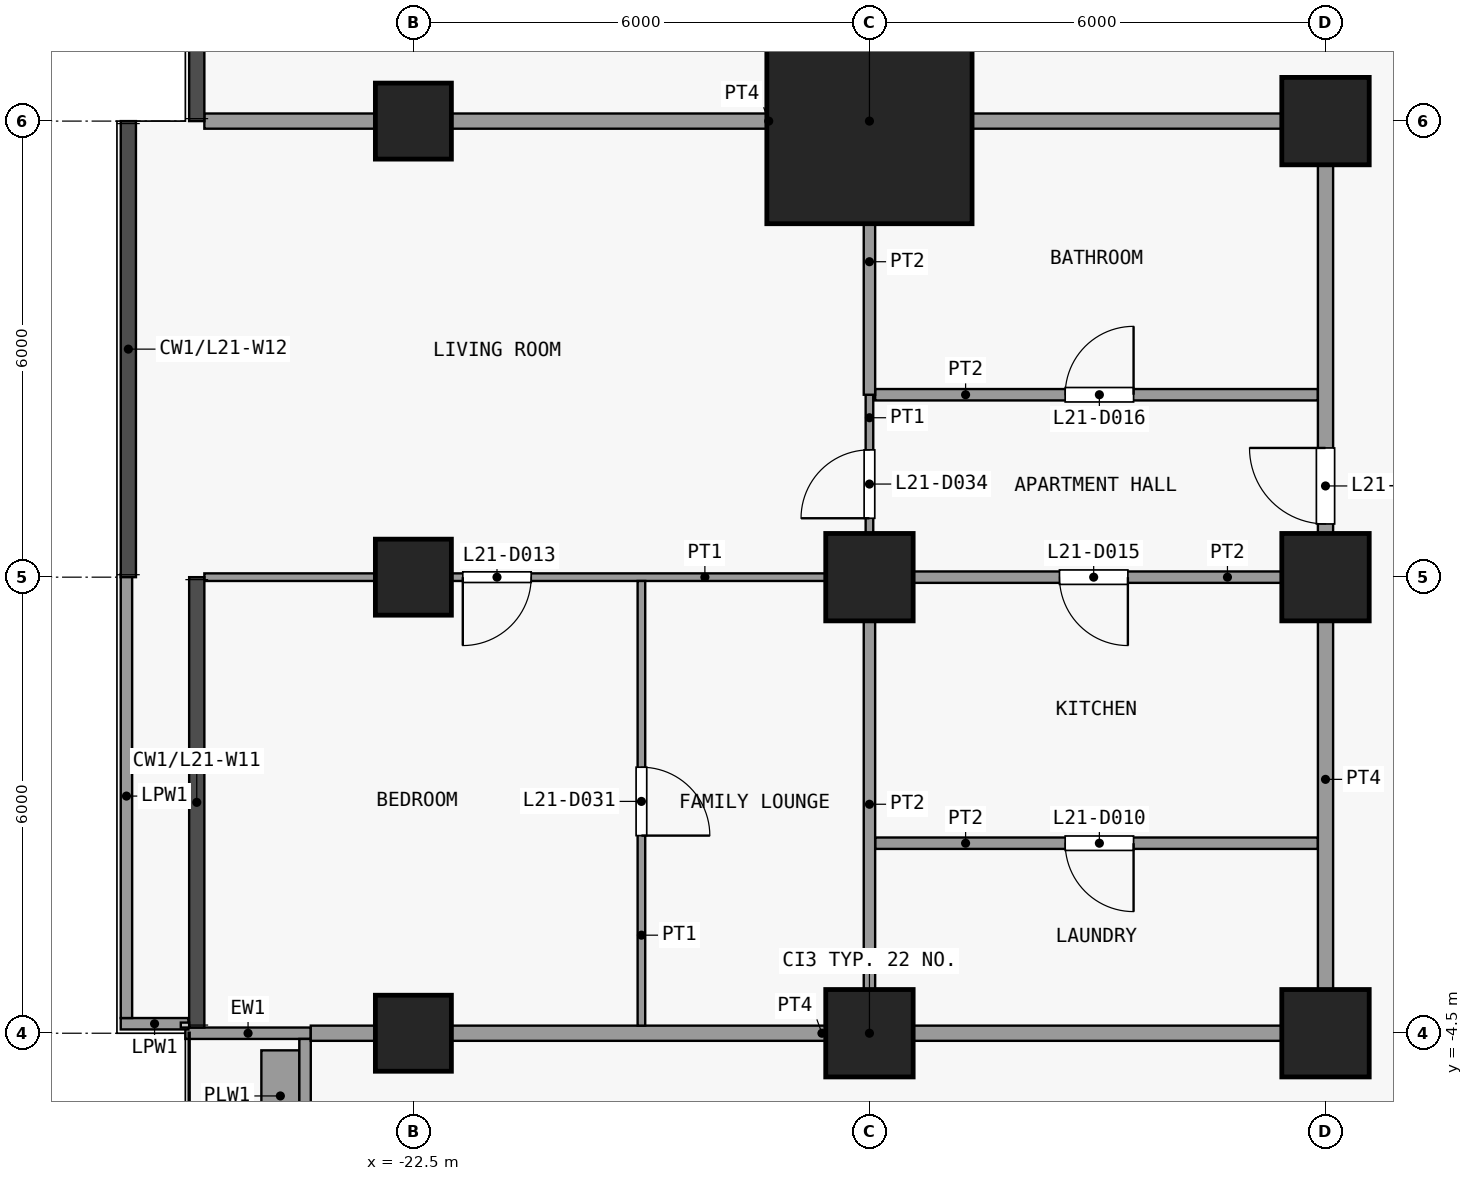
"""IFC4 building model, lengths in metres.
Left out: names, types, materials, properties, quantities, classifications, styles, units other than length and angle.
Written with IfcOpenShell. Run it as: python <this file> out.ifc"""

import sys

from ifc_helpers import new_model, si_unit, direction, frame, frame_2d, origin, origin_2d, place, context, subcontext, project, spatial, rectangle, extrude, element, fill, save


model = new_model("IFC4")
c1 = context("Model", 3, precision=1e-05, world=origin(), true_north=direction((0.0, 1.0)))
c2 = subcontext(c1, "Body", "Model", "MODEL_VIEW")
j1 = project(units=[si_unit("LENGTHUNIT", "METRE"), si_unit("PLANEANGLEUNIT", "RADIAN")], contexts=[c1])
p1 = place(None, origin())
s1 = spatial("IfcSite", under=j1, at=p1, CompositionType="ELEMENT")
p2 = place(p1, origin())
s2 = spatial("IfcBuilding", under=s1, at=p2, CompositionType="ELEMENT")
p3 = place(p2, frame((0.0, 0.0, 88.3)))
s3 = spatial("IfcBuildingStorey", under=s2, at=p3, CompositionType="ELEMENT", Elevation=88.3)
for number, where, z_axis, x_axis in (
    (1, (-22.5, -4.5, 0.0), (0.0, 0.0, 1.0), (1.0, 0.0, 0.0)),
    (2, (-22.5, 1.5, 0.0), (0.0, 0.0, 1.0), (1.0, 0.0, 0.0)),
    (3, (-22.5, 7.5, 0.0), (0.0, 0.0, 1.0), (1.0, 0.0, 0.0)),
):
    element("IfcColumn", number, at=place(p3, frame(where, z_axis=z_axis, x_axis=x_axis)), inside=s3, PredefinedType="COLUMN", context=c2, shape_type="SweptSolid", body=[
        extrude(rectangle(XDim=1.0, YDim=1.0, at=origin_2d()), origin(), (0.0, 0.0, 1.0), 3.6),
    ])
for number, where, z_axis, x_axis in (
    (4, (-16.5, -4.5, 0.0), (0.0, 0.0, 1.0), (1.0, 0.0, 0.0)),
    (5, (-16.5, 1.5, 0.0), (0.0, 0.0, 1.0), (1.0, 0.0, 0.0)),
):
    element("IfcColumn", number, at=place(p3, frame(where, z_axis=z_axis, x_axis=x_axis)), inside=s3, PredefinedType="COLUMN", context=c2, shape_type="SweptSolid", body=[
        extrude(rectangle(XDim=1.15, YDim=1.15, at=origin_2d()), origin(), (0.0, 0.0, 1.0), 3.6),
    ])
p4 = place(p3, frame((-16.5, 7.5, 0.0), z_axis=(0.0, 0.0, 1.0), x_axis=(1.0, 0.0, 0.0)))
e6 = element("IfcColumn", 6, at=p4, inside=s3, PredefinedType="COLUMN", context=c2, shape_type="SweptSolid", body=[
    extrude(rectangle(XDim=2.7, YDim=2.7, at=origin_2d()), origin(), (0.0, 0.0, 1.0), 3.6),
])
for number, where, z_axis, x_axis in (
    (7, (-10.5, -4.5, 0.0), (0.0, 0.0, 1.0), (1.0, 0.0, 0.0)),
    (8, (-10.5, 1.5, 0.0), (0.0, 0.0, 1.0), (1.0, 0.0, 0.0)),
    (9, (-10.5, 7.5, 0.0), (0.0, 0.0, 1.0), (1.0, 0.0, 0.0)),
):
    element("IfcColumn", number, at=place(p3, frame(where, z_axis=z_axis, x_axis=x_axis)), inside=s3, PredefinedType="COLUMN", context=c2, shape_type="SweptSolid", body=[
        extrude(rectangle(XDim=1.15, YDim=1.15, at=origin_2d()), origin(), (0.0, 0.0, 1.0), 3.6),
    ])
p5 = place(p3, frame((-23.85, -4.5, 0.0), z_axis=(0.0, 0.0, 1.0), x_axis=(-1.0, 0.0, 0.0)))
e10 = element("IfcWall", 10, at=p5, inside=s3, PredefinedType="SOLIDWALL", context=c2, shape_type="SweptSolid", body=[
    extrude(rectangle(XDim=1.65, YDim=0.15, at=frame_2d((0.825, 0.0))), origin(), (0.0, 0.0, 1.0), 3.3),
])
p6 = place(p3, frame((-23.925, -13.425, 0.0), z_axis=(0.0, 0.0, 1.0), x_axis=(0.0, 1.0, 0.0)))
e11 = element("IfcWall", 11, at=p6, inside=s3, PredefinedType="SOLIDWALL", context=c2, shape_type="SweptSolid", body=[
    extrude(rectangle(XDim=8.85, YDim=0.15, at=frame_2d((4.425, 0.0))), origin(), (0.0, 0.0, 1.0), 3.3),
])
p7 = place(p6, frame((2.125, 0.0, 0.0)))
e12 = element("IfcOpeningElement", 12, at=p7, cuts=e11, PredefinedType="OPENING", context=c2, shape_type="SweptSolid", body=[
    extrude(rectangle(XDim=1.2, YDim=2.4, at=frame_2d((0.6, 1.2))), frame((0.0, 0.085, 0.0), z_axis=(0.0, -1.0, 0.0), x_axis=(1.0, 0.0, 0.0)), (0.0, 0.0, 1.0), 0.17),
])
p8 = place(p6, frame((0.25, 0.0, 0.9)))
e13 = element("IfcOpeningElement", 13, at=p8, cuts=e11, PredefinedType="OPENING", context=c2, shape_type="SweptSolid", body=[
    extrude(rectangle(XDim=1.625, YDim=2.1, at=frame_2d((0.812, 1.05))), frame((0.0, 0.085, 0.0), z_axis=(0.0, -1.0, 0.0), x_axis=(1.0, 0.0, 0.0)), (0.0, 0.0, 1.0), 0.17),
])
p9 = place(p6, frame((5.775, 0.0, 0.9)))
e14 = element("IfcOpeningElement", 14, at=p9, cuts=e11, PredefinedType="OPENING", context=c2, shape_type="SweptSolid", body=[
    extrude(rectangle(XDim=1.812, YDim=2.1, at=frame_2d((0.906, 1.05))), frame((0.0, 0.085, 0.0), z_axis=(0.0, -1.0, 0.0), x_axis=(1.0, 0.0, 0.0)), (0.0, 0.0, 1.0), 0.17),
])
p10 = place(p3, frame((-24.25, -5.925, 0.0), z_axis=(0.0, 0.0, 1.0), x_axis=(0.0, 1.0, 0.0)))
e15 = element("IfcWall", 15, at=p10, inside=s3, PredefinedType="USERDEFINED", context=c2, shape_type="SweptSolid", body=[
    extrude(rectangle(XDim=1.2, YDim=0.5, at=frame_2d((0.6, 0.0))), origin(), (0.0, 0.0, 1.0), 0.9),
])
p11 = place(p3, frame((-25.46, -4.375, 0.0), z_axis=(0.0, 0.0, 1.0), x_axis=(-1.0, 0.0, 0.0)))
e16 = element("IfcWall", 16, at=p11, inside=s3, PredefinedType="PARAPET", context=c2, shape_type="SweptSolid", body=[
    extrude(rectangle(XDim=0.89, YDim=0.15, at=frame_2d((0.445, 0.0))), origin(), (0.0, 0.0, 1.0), 1.15),
])
p12 = place(p3, frame((-26.275, -4.3, 0.0), z_axis=(0.0, 0.0, 1.0), x_axis=(0.0, 1.0, 0.0)))
e17 = element("IfcWall", 17, at=p12, inside=s3, PredefinedType="PARAPET", context=c2, shape_type="SweptSolid", body=[
    extrude(rectangle(XDim=5.84, YDim=0.15, at=frame_2d((2.92, 0.0))), origin(), (0.0, 0.0, 1.0), 1.15),
])
p13 = place(p3, frame((-23.85, -4.5, 0.0), z_axis=(0.0, 0.0, 1.0), x_axis=(1.0, 0.0, 0.0)))
e18 = element("IfcWall", 18, at=p13, inside=s3, PredefinedType="PARTITIONING", context=c2, shape_type="SweptSolid", body=[
    extrude(rectangle(XDim=13.45, YDim=0.2, at=frame_2d((6.725, 0.0))), origin(), (0.0, 0.0, 1.0), 3.3),
])
p14 = place(p3, frame((-16.425, -2.0, 0.0), z_axis=(0.0, 0.0, 1.0), x_axis=(1.0, 0.0, 0.0)))
e19 = element("IfcWall", 19, at=p14, inside=s3, PredefinedType="PARTITIONING", context=c2, shape_type="SweptSolid", body=[
    extrude(rectangle(XDim=5.825, YDim=0.15, at=frame_2d((2.913, 0.0))), origin(), (0.0, 0.0, 1.0), 3.3),
])
p15 = place(p14, frame((2.5, 0.0, 0.0)))
e20 = element("IfcOpeningElement", 20, at=p15, cuts=e19, PredefinedType="OPENING", context=c2, shape_type="SweptSolid", body=[
    extrude(rectangle(XDim=0.9, YDim=2.1, at=frame_2d((0.45, 1.05))), frame((0.0, 0.085, 0.0), z_axis=(0.0, -1.0, 0.0), x_axis=(1.0, 0.0, 0.0)), (0.0, 0.0, 1.0), 0.17),
])
p16 = place(p3, frame((-25.25, 1.5, 0.0), z_axis=(0.0, 0.0, 1.0), x_axis=(1.0, 0.0, 0.0)))
e21 = element("IfcWall", 21, at=p16, inside=s3, PredefinedType="PARTITIONING", context=c2, shape_type="SweptSolid", body=[
    extrude(rectangle(XDim=8.75, YDim=0.1, at=frame_2d((4.375, 0.0))), origin(), (0.0, 0.0, 1.0), 3.3),
])
p17 = place(p16, frame((3.4, 0.0, 0.0)))
e22 = element("IfcOpeningElement", 22, at=p17, cuts=e21, PredefinedType="OPENING", context=c2, shape_type="SweptSolid", body=[
    extrude(rectangle(XDim=0.9, YDim=2.1, at=frame_2d((0.45, 1.05))), frame((0.0, 0.06, 0.0), z_axis=(0.0, -1.0, 0.0), x_axis=(1.0, 0.0, 0.0)), (0.0, 0.0, 1.0), 0.12),
])
p18 = place(p3, frame((-16.5, 1.5, 0.0), z_axis=(0.0, 0.0, 1.0), x_axis=(1.0, 0.0, 0.0)))
e23 = element("IfcWall", 23, at=p18, inside=s3, PredefinedType="PARTITIONING", context=c2, shape_type="SweptSolid", body=[
    extrude(rectangle(XDim=5.9, YDim=0.15, at=frame_2d((2.95, 0.0))), origin(), (0.0, 0.0, 1.0), 3.3),
])
p19 = place(p18, frame((2.5, 0.0, 0.0)))
e24 = element("IfcOpeningElement", 24, at=p19, cuts=e23, PredefinedType="OPENING", context=c2, shape_type="SweptSolid", body=[
    extrude(rectangle(XDim=0.9, YDim=2.1, at=frame_2d((0.45, 1.05))), frame((0.0, 0.085, 0.0), z_axis=(0.0, -1.0, 0.0), x_axis=(1.0, 0.0, 0.0)), (0.0, 0.0, 1.0), 0.17),
])
p20 = place(p3, frame((-16.425, 3.9, 0.0), z_axis=(0.0, 0.0, 1.0), x_axis=(1.0, 0.0, 0.0)))
e25 = element("IfcWall", 25, at=p20, inside=s3, PredefinedType="PARTITIONING", context=c2, shape_type="SweptSolid", body=[
    extrude(rectangle(XDim=5.825, YDim=0.15, at=frame_2d((2.913, 0.0))), origin(), (0.0, 0.0, 1.0), 3.3),
])
p21 = place(p20, frame((2.5, 0.0, 0.0)))
e26 = element("IfcOpeningElement", 26, at=p21, cuts=e25, PredefinedType="OPENING", context=c2, shape_type="SweptSolid", body=[
    extrude(rectangle(XDim=0.9, YDim=2.1, at=frame_2d((0.45, 1.05))), frame((0.0, 0.085, 0.0), z_axis=(0.0, -1.0, 0.0), x_axis=(1.0, 0.0, 0.0)), (0.0, 0.0, 1.0), 0.17),
])
p22 = place(p3, frame((-25.25, 7.5, 0.0), z_axis=(0.0, 0.0, 1.0), x_axis=(1.0, 0.0, 0.0)))
e27 = element("IfcWall", 27, at=p22, inside=s3, PredefinedType="PARTITIONING", context=c2, shape_type="SweptSolid", body=[
    extrude(rectangle(XDim=14.85, YDim=0.2, at=frame_2d((7.425, 0.0))), origin(), (0.0, 0.0, 1.0), 3.3),
])
p23 = place(p3, frame((-19.5, -4.4, 0.0), z_axis=(0.0, 0.0, 1.0), x_axis=(0.0, 1.0, 0.0)))
e28 = element("IfcWall", 28, at=p23, inside=s3, PredefinedType="PARTITIONING", context=c2, shape_type="SweptSolid", body=[
    extrude(rectangle(XDim=5.85, YDim=0.1, at=frame_2d((2.925, 0.0))), origin(), (0.0, 0.0, 1.0), 3.3),
])
p24 = place(p23, frame((2.5, 0.0, 0.0)))
e29 = element("IfcOpeningElement", 29, at=p24, cuts=e28, PredefinedType="OPENING", context=c2, shape_type="SweptSolid", body=[
    extrude(rectangle(XDim=0.9, YDim=2.1, at=frame_2d((0.45, 1.05))), frame((0.0, 0.06, 0.0), z_axis=(0.0, -1.0, 0.0), x_axis=(1.0, 0.0, 0.0)), (0.0, 0.0, 1.0), 0.12),
])
p25 = place(p3, frame((-16.5, 1.575, 0.0), z_axis=(0.0, 0.0, 1.0), x_axis=(0.0, 1.0, 0.0)))
e30 = element("IfcWall", 30, at=p25, inside=s3, PredefinedType="PARTITIONING", context=c2, shape_type="SweptSolid", body=[
    extrude(rectangle(XDim=2.325, YDim=0.1, at=frame_2d((1.163, 0.0))), origin(), (0.0, 0.0, 1.0), 3.3),
])
p26 = place(p25, frame((0.7, 0.0, 0.0)))
e31 = element("IfcOpeningElement", 31, at=p26, cuts=e30, PredefinedType="OPENING", context=c2, shape_type="SweptSolid", body=[
    extrude(rectangle(XDim=0.9, YDim=2.1, at=frame_2d((0.45, 1.05))), frame((0.0, 0.06, 0.0), z_axis=(0.0, -1.0, 0.0), x_axis=(1.0, 0.0, 0.0)), (0.0, 0.0, 1.0), 0.12),
])
p27 = place(p3, frame((-16.5, -4.4, 0.0), z_axis=(0.0, 0.0, 1.0), x_axis=(0.0, 1.0, 0.0)))
e32 = element("IfcWall", 32, at=p27, inside=s3, PredefinedType="PARTITIONING", context=c2, shape_type="SweptSolid", body=[
    extrude(rectangle(XDim=5.825, YDim=0.15, at=frame_2d((2.913, 0.0))), origin(), (0.0, 0.0, 1.0), 3.3),
])
p28 = place(p3, frame((-16.5, 3.9, 0.0), z_axis=(0.0, 0.0, 1.0), x_axis=(0.0, 1.0, 0.0)))
e33 = element("IfcWall", 33, at=p28, inside=s3, PredefinedType="PARTITIONING", context=c2, shape_type="SweptSolid", body=[
    extrude(rectangle(XDim=3.5, YDim=0.15, at=frame_2d((1.75, 0.0))), origin(), (0.0, 0.0, 1.0), 3.3),
])
p29 = place(p3, frame((-10.5, -4.4, 0.0), z_axis=(0.0, 0.0, 1.0), x_axis=(0.0, 1.0, 0.0)))
e34 = element("IfcWall", 34, at=p29, inside=s3, PredefinedType="PARTITIONING", context=c2, shape_type="SweptSolid", body=[
    extrude(rectangle(XDim=11.8, YDim=0.2, at=frame_2d((5.9, 0.0))), origin(), (0.0, 0.0, 1.0), 3.3),
])
p30 = place(p29, frame((6.6, 0.0, 0.0)))
e35 = element("IfcOpeningElement", 35, at=p30, cuts=e34, PredefinedType="OPENING", context=c2, shape_type="SweptSolid", body=[
    extrude(rectangle(XDim=1.0, YDim=2.1, at=frame_2d((0.5, 1.05))), frame((0.0, 0.11, 0.0), z_axis=(0.0, -1.0, 0.0), x_axis=(1.0, 0.0, 0.0)), (0.0, 0.0, 1.0), 0.22),
])
p31 = place(p15, origin())
e36 = element("IfcDoor", 36, at=p31, inside=s3, OperationType="SINGLE_SWING_RIGHT", PredefinedType="DOOR", context=c2, shape_type="SweptSolid", body=[
    extrude(rectangle(XDim=0.9, YDim=2.1, at=frame_2d((0.45, 1.05))), frame((0.0, 0.025, 0.0), z_axis=(0.0, -1.0, 0.0), x_axis=(1.0, 0.0, 0.0)), (0.0, 0.0, 1.0), 0.05),
])
fill(e20, e36)
p32 = place(p17, origin())
e37 = element("IfcDoor", 37, at=p32, inside=s3, OperationType="SINGLE_SWING_LEFT", PredefinedType="DOOR", context=c2, shape_type="SweptSolid", body=[
    extrude(rectangle(XDim=0.9, YDim=2.1, at=frame_2d((0.45, 1.05))), frame((0.0, 0.025, 0.0), z_axis=(0.0, -1.0, 0.0), x_axis=(1.0, 0.0, 0.0)), (0.0, 0.0, 1.0), 0.05),
])
fill(e22, e37)
p33 = place(p19, origin())
e38 = element("IfcDoor", 38, at=p33, inside=s3, OperationType="SINGLE_SWING_RIGHT", PredefinedType="DOOR", context=c2, shape_type="SweptSolid", body=[
    extrude(rectangle(XDim=0.9, YDim=2.1, at=frame_2d((0.45, 1.05))), frame((0.0, 0.025, 0.0), z_axis=(0.0, -1.0, 0.0), x_axis=(1.0, 0.0, 0.0)), (0.0, 0.0, 1.0), 0.05),
])
fill(e24, e38)
p34 = place(p21, origin())
e39 = element("IfcDoor", 39, at=p34, inside=s3, OperationType="SINGLE_SWING_LEFT", PredefinedType="DOOR", context=c2, shape_type="SweptSolid", body=[
    extrude(rectangle(XDim=0.9, YDim=2.1, at=frame_2d((0.45, 1.05))), frame((0.0, 0.025, 0.0), z_axis=(0.0, -1.0, 0.0), x_axis=(1.0, 0.0, 0.0)), (0.0, 0.0, 1.0), 0.05),
])
fill(e26, e39)
p35 = place(p24, origin())
e40 = element("IfcDoor", 40, at=p35, inside=s3, OperationType="SINGLE_SWING_LEFT", PredefinedType="DOOR", context=c2, shape_type="SweptSolid", body=[
    extrude(rectangle(XDim=0.9, YDim=2.1, at=frame_2d((0.45, 1.05))), frame((0.0, 0.025, 0.0), z_axis=(0.0, -1.0, 0.0), x_axis=(1.0, 0.0, 0.0)), (0.0, 0.0, 1.0), 0.05),
])
fill(e29, e40)
p36 = place(p26, origin())
e41 = element("IfcDoor", 41, at=p36, inside=s3, OperationType="SINGLE_SWING_RIGHT", PredefinedType="DOOR", context=c2, shape_type="SweptSolid", body=[
    extrude(rectangle(XDim=0.9, YDim=2.1, at=frame_2d((0.45, 1.05))), frame((0.0, 0.025, 0.0), z_axis=(0.0, -1.0, 0.0), x_axis=(1.0, 0.0, 0.0)), (0.0, 0.0, 1.0), 0.05),
])
fill(e31, e41)
p37 = place(p30, origin())
e42 = element("IfcDoor", 42, at=p37, inside=s3, OperationType="SINGLE_SWING_LEFT", PredefinedType="DOOR", context=c2, shape_type="SweptSolid", body=[
    extrude(rectangle(XDim=1.0, YDim=2.1, at=frame_2d((0.5, 1.05))), frame((0.0, 0.025, 0.0), z_axis=(0.0, -1.0, 0.0), x_axis=(1.0, 0.0, 0.0)), (0.0, 0.0, 1.0), 0.05),
])
fill(e35, e42)
save(model, sys.argv[1])
